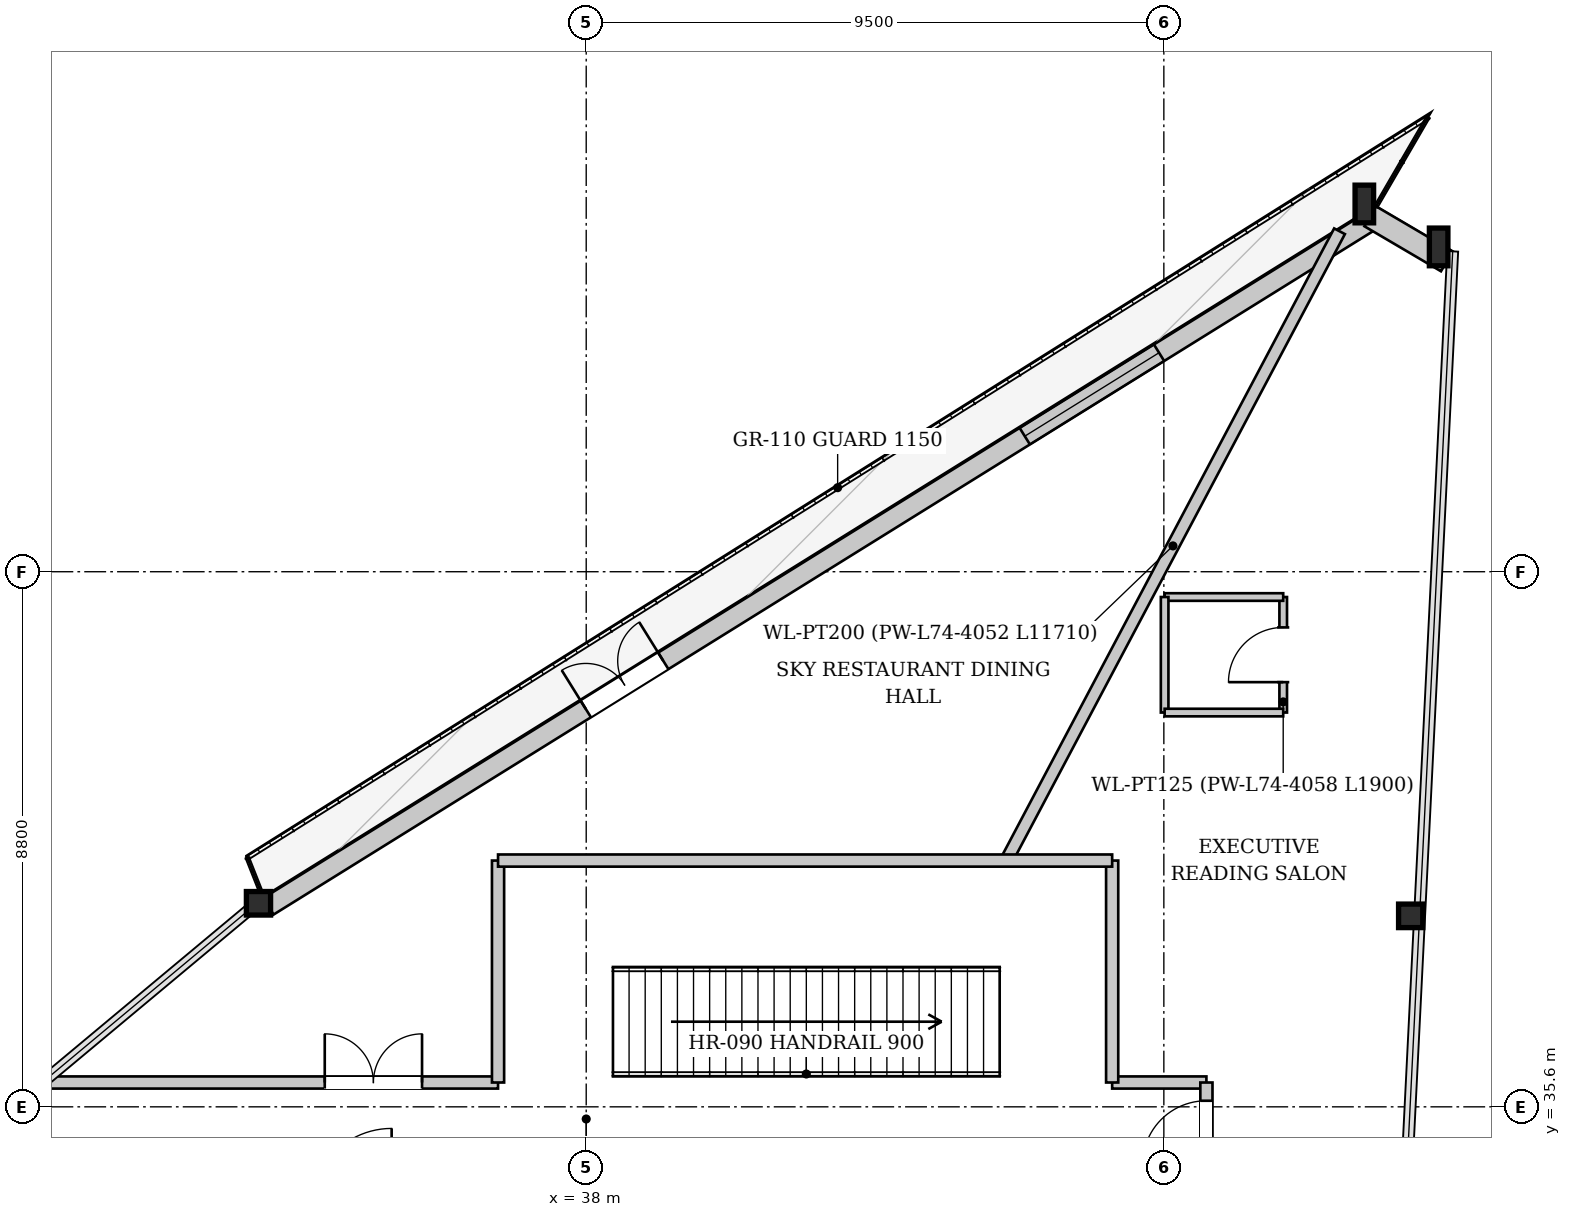
"""IFC4 building model, lengths in metres.
Left out: names, types, materials, properties, quantities, classifications, styles, units other than length and angle.
Written with IfcOpenShell. Run it as: python <this file> out.ifc"""

import sys

from ifc_helpers import new_model, si_unit, direction, frame, frame_2d, origin, origin_2d, place, context, subcontext, project, spatial, rectangle, i_section, extrude, source, transform, mapped, element, fill, save


model = new_model("IFC4")
c1 = context("Model", 3, precision=1e-05, world=origin(), true_north=direction((0.0, 1.0)))
c2 = subcontext(c1, "Body", "Model", "MODEL_VIEW")
j1 = project(units=[si_unit("LENGTHUNIT", "METRE"), si_unit("PLANEANGLEUNIT", "RADIAN")], contexts=[c1])
p1 = place(None, origin())
s1 = spatial("IfcSite", under=j1, at=p1, CompositionType="ELEMENT")
p2 = place(p1, origin())
s2 = spatial("IfcBuilding", under=s1, at=p2, CompositionType="ELEMENT")
p3 = place(p2, frame((0.0, 0.0, 277.7)))
s3 = spatial("IfcBuildingStorey", under=s2, at=p3, CompositionType="ELEMENT", Elevation=277.7)
m1 = source(origin(), c2, "Body", "SweptSolid", [
    extrude(i_section(OverallWidth=0.305, OverallDepth=0.62, WebThickness=0.021, FlangeThickness=0.04, at=origin_2d()), origin(), (0.0, 0.0, 1.0), 3.965),
])
p4 = place(p3, frame((52.25, 49.668, 0.0), z_axis=(-0.116565767107, 0.036761628612, 0.992502395262), x_axis=(-0.30076967496, -0.953696808543, 0.0)))
e1 = element("IfcColumn", 1, at=p4, inside=s3, PredefinedType="COLUMN", context=c2, shape_type="MappedRepresentation", body=[
    mapped(m1, transform((0.0, 0.0, 0.0), x_axis=(1.0, 0.0, 0.0), y_axis=(0.0, 1.0, 0.0), z_axis=(0.0, 0.0, 1.0), scale=1.0)),
])
m2 = source(origin(), c2, "Body", "SweptSolid", [
    extrude(i_section(OverallWidth=0.305, OverallDepth=0.62, WebThickness=0.021, FlangeThickness=0.04, at=origin_2d()), origin(), (0.0, 0.0, 1.0), 3.955),
])
p5 = place(p3, frame((50.991, 50.409, 0.0), z_axis=(-0.098091029512, 0.019568820865, 0.994985030631), x_axis=(-0.195641369689, -0.980675509262, 0.0)))
e2 = element("IfcColumn", 2, at=p5, inside=s3, PredefinedType="COLUMN", context=c2, shape_type="MappedRepresentation", body=[
    mapped(m2, transform((0.0, 0.0, 0.0), x_axis=(1.0, 0.0, 0.0), y_axis=(0.0, 1.0, 0.0), z_axis=(0.0, 0.0, 1.0), scale=1.0)),
])
m3 = source(origin(), c2, "Body", "SweptSolid", [
    extrude(i_section(OverallWidth=0.398, OverallDepth=0.387, WebThickness=0.019, FlangeThickness=0.029, at=origin_2d()), origin(), (0.0, 0.0, 1.0), 3.942),
])
p6 = place(p3, frame((32.689, 39.033, 0.0), z_axis=(-0.040194461777, -0.043724637927, 0.998234722538), x_axis=(0.736201135631, -0.676762800318, 0.0)))
e3 = element("IfcColumn", 3, at=p6, inside=s3, PredefinedType="COLUMN", context=c2, shape_type="MappedRepresentation", body=[
    mapped(m3, transform((0.0, 0.0, 0.0), x_axis=(1.0, 0.0, 0.0), y_axis=(0.0, 1.0, 0.0), z_axis=(0.0, 0.0, 1.0), scale=1.0)),
])
m4 = source(origin(), c2, "Body", "SweptSolid", [
    extrude(i_section(OverallWidth=0.398, OverallDepth=0.387, WebThickness=0.019, FlangeThickness=0.029, at=origin_2d()), origin(), (0.0, 0.0, 1.0), 3.949),
])
p7 = place(p3, frame((51.702, 38.656, 0.0), z_axis=(-0.072270027482, 0.043213643464, 0.996448505517), x_axis=(-0.513199536889, -0.858269325641, 0.0)))
e4 = element("IfcColumn", 4, at=p7, inside=s3, PredefinedType="COLUMN", context=c2, shape_type="MappedRepresentation", body=[
    mapped(m4, transform((0.0, 0.0, 0.0), x_axis=(1.0, 0.0, 0.0), y_axis=(0.0, 1.0, 0.0), z_axis=(0.0, 0.0, 1.0), scale=1.0)),
])
p8 = place(p3, frame((32.774, 38.898, 0.0), z_axis=(0.0, 0.0, 1.0), x_axis=(0.849325275004, 0.527869848769, 0.0)))
e5 = element("IfcWall", 5, at=p8, inside=s3, PredefinedType="SOLIDWALL", context=c2, shape_type="SweptSolid", body=[
    extrude(rectangle(XDim=21.549, YDim=0.32, at=frame_2d((10.774, 0.0))), origin(), (0.0, 0.0, 1.0), 3.462),
])
p9 = place(p8, frame((6.146, 0.0, 0.0)))
e6 = element("IfcOpeningElement", 6, at=p9, cuts=e5, PredefinedType="OPENING", context=c2, shape_type="SweptSolid", body=[
    extrude(rectangle(XDim=1.5, YDim=2.3, at=frame_2d((0.75, 1.15))), frame((0.0, 0.17, 0.0), z_axis=(0.0, -1.0, 0.0), x_axis=(1.0, 0.0, 0.0)), (0.0, 0.0, 1.0), 0.34),
])
p10 = place(p8, frame((14.646, 0.0, 0.65)))
e7 = element("IfcOpeningElement", 7, at=p10, cuts=e5, PredefinedType="OPENING", context=c2, shape_type="SweptSolid", body=[
    extrude(rectangle(XDim=2.6, YDim=2.35, at=frame_2d((1.3, 1.175))), frame((0.0, 0.17, 0.0), z_axis=(0.0, -1.0, 0.0), x_axis=(1.0, 0.0, 0.0)), (0.0, 0.0, 1.0), 0.34),
])
p11 = place(p3, frame((50.895, 50.245, 0.0), z_axis=(0.0, 0.0, 1.0), x_axis=(0.862045920942, -0.506830178844, 0.0)))
e8 = element("IfcWall", 8, at=p11, inside=s3, PredefinedType="SOLIDWALL", context=c2, shape_type="SweptSolid", body=[
    extrude(rectangle(XDim=1.46, YDim=0.38, at=frame_2d((0.73, 0.0))), origin(), (0.0, 0.0, 1.0), 3.462),
])
p12 = place(p3, frame((44.91, 39.65, 0.0), z_axis=(0.0, 0.0, 1.0), x_axis=(0.467924120406, 0.883768644806, 0.0)))
e9 = element("IfcWall", 9, at=p12, inside=s3, PredefinedType="PARTITIONING", context=c2, shape_type="SweptSolid", body=[
    extrude(rectangle(XDim=11.71, YDim=0.2, at=frame_2d((5.855, 0.0))), origin(), (0.0, 0.0, 1.0), 3.515),
])
p13 = place(p3, frame((49.463, 42.084, 0.0), z_axis=(0.0, 0.0, 1.0), x_axis=(0.0, 1.0, 0.0)))
e10 = element("IfcWall", 10, at=p13, inside=s3, PredefinedType="PARTITIONING", context=c2, shape_type="SweptSolid", body=[
    extrude(rectangle(XDim=1.9, YDim=0.125, at=frame_2d((0.95, 0.0))), origin(), (0.0, 0.0, 1.0), 3.92),
])
p14 = place(p13, frame((0.5, 0.0, 0.0)))
e11 = element("IfcOpeningElement", 11, at=p14, cuts=e10, PredefinedType="OPENING", context=c2, shape_type="SweptSolid", body=[
    extrude(rectangle(XDim=0.9, YDim=2.1, at=frame_2d((0.45, 1.05))), frame((0.0, 0.073, 0.0), z_axis=(0.0, -1.0, 0.0), x_axis=(1.0, 0.0, 0.0)), (0.0, 0.0, 1.0), 0.145),
])
p15 = place(p3, frame((49.463, 43.984, 0.0), z_axis=(0.0, 0.0, 1.0), x_axis=(-1.0, 0.0, 0.0)))
e12 = element("IfcWall", 12, at=p15, inside=s3, PredefinedType="PARTITIONING", context=c2, shape_type="SweptSolid", body=[
    extrude(rectangle(XDim=1.95, YDim=0.125, at=frame_2d((0.975, 0.0))), origin(), (0.0, 0.0, 1.0), 3.92),
])
p16 = place(p3, frame((47.513, 43.984, 0.0), z_axis=(0.0, 0.0, 1.0), x_axis=(0.0, -1.0, 0.0)))
e13 = element("IfcWall", 13, at=p16, inside=s3, PredefinedType="PARTITIONING", context=c2, shape_type="SweptSolid", body=[
    extrude(rectangle(XDim=1.9, YDim=0.125, at=frame_2d((0.95, 0.0))), origin(), (0.0, 0.0, 1.0), 3.92),
])
p17 = place(p3, frame((47.513, 42.084, 0.0), z_axis=(0.0, 0.0, 1.0), x_axis=(1.0, 0.0, 0.0)))
e14 = element("IfcWall", 14, at=p17, inside=s3, PredefinedType="PARTITIONING", context=c2, shape_type="SweptSolid", body=[
    extrude(rectangle(XDim=1.95, YDim=0.125, at=frame_2d((0.975, 0.0))), origin(), (0.0, 0.0, 1.0), 3.92),
])
p18 = place(p3, frame((29.101, 36.0, 0.0), z_axis=(0.0, 0.0, 1.0), x_axis=(1.0, 0.0, 0.0)))
e15 = element("IfcWall", 15, at=p18, inside=s3, PredefinedType="PARTITIONING", context=c2, shape_type="SweptSolid", body=[
    extrude(rectangle(XDim=7.449, YDim=0.2, at=frame_2d((3.725, 0.0))), origin(), (0.0, 0.0, 1.0), 3.92),
])
p19 = place(p18, frame((4.599, 0.0, 0.0)))
e16 = element("IfcOpeningElement", 16, at=p19, cuts=e15, PredefinedType="OPENING", context=c2, shape_type="SweptSolid", body=[
    extrude(rectangle(XDim=1.6, YDim=2.2, at=frame_2d((0.8, 1.1))), frame((0.0, 0.11, 0.0), z_axis=(0.0, -1.0, 0.0), x_axis=(1.0, 0.0, 0.0)), (0.0, 0.0, 1.0), 0.22),
])
p20 = place(p3, frame((46.65, 36.0, 0.0), z_axis=(0.0, 0.0, 1.0), x_axis=(1.0, 0.0, 0.0)))
e17 = element("IfcWall", 17, at=p20, inside=s3, PredefinedType="PARTITIONING", context=c2, shape_type="SweptSolid", body=[
    extrude(rectangle(XDim=1.55, YDim=0.2, at=frame_2d((0.775, 0.0))), origin(), (0.0, 0.0, 1.0), 3.92),
])
p21 = place(p3, frame((48.2, 23.0, 0.0), z_axis=(0.0, 0.0, 1.0), x_axis=(0.0, 1.0, 0.0)))
e18 = element("IfcWall", 18, at=p21, inside=s3, PredefinedType="PARTITIONING", context=c2, shape_type="SweptSolid", body=[
    extrude(rectangle(XDim=13.0, YDim=0.2, at=frame_2d((6.5, 0.0))), origin(), (0.0, 0.0, 1.0), 3.605),
])
p22 = place(p21, frame((6.366, 0.0, 0.0)))
e19 = element("IfcOpeningElement", 19, at=p22, cuts=e18, PredefinedType="OPENING", context=c2, shape_type="SweptSolid", body=[
    extrude(rectangle(XDim=1.05, YDim=2.2, at=frame_2d((0.525, 1.1))), frame((0.0, 0.11, 0.0), z_axis=(0.0, -1.0, 0.0), x_axis=(1.0, 0.0, 0.0)), (0.0, 0.0, 1.0), 0.22),
])
p23 = place(p21, frame((11.65, 0.0, 0.0)))
e20 = element("IfcOpeningElement", 20, at=p23, cuts=e18, PredefinedType="OPENING", context=c2, shape_type="SweptSolid", body=[
    extrude(rectangle(XDim=1.05, YDim=2.2, at=frame_2d((0.525, 1.1))), frame((0.0, 0.11, 0.0), z_axis=(0.0, -1.0, 0.0), x_axis=(1.0, 0.0, 0.0)), (0.0, 0.0, 1.0), 0.22),
])
for number, where, z_axis, x_axis in (
    (21, (36.55, 36.0, 0.0), (0.0, 0.0, 1.0), (0.0, 1.0, 0.0)),
    (22, (46.65, 36.0, 0.0), (0.0, 0.0, 1.0), (0.0, 1.0, 0.0)),
):
    element("IfcWall", number, at=place(p3, frame(where, z_axis=z_axis, x_axis=x_axis)), inside=s3, PredefinedType="PARTITIONING", context=c2, shape_type="SweptSolid", body=[
        extrude(rectangle(XDim=3.65, YDim=0.2, at=frame_2d((1.825, 0.0))), origin(), (0.0, 0.0, 1.0), 3.92),
    ])
p24 = place(p3, frame((36.55, 39.65, 0.0), z_axis=(0.0, 0.0, 1.0), x_axis=(1.0, 0.0, 0.0)))
e23 = element("IfcWall", 23, at=p24, inside=s3, PredefinedType="PARTITIONING", context=c2, shape_type="SweptSolid", body=[
    extrude(rectangle(XDim=10.1, YDim=0.2, at=frame_2d((5.05, 0.0))), origin(), (0.0, 0.0, 1.0), 3.92),
])
m5 = source(origin(), c2, "Body", "SweptSolid", [
    extrude(rectangle(XDim=1.5, YDim=2.3, at=frame_2d((0.75, 1.15))), frame((0.0, 0.025, 0.0), z_axis=(0.0, -1.0, 0.0), x_axis=(1.0, 0.0, 0.0)), (0.0, 0.0, 1.0), 0.05),
])
p25 = place(p9, origin())
e24 = element("IfcDoor", 24, at=p25, inside=s3, OperationType="DOUBLE_DOOR_SINGLE_SWING", PredefinedType="DOOR", context=c2, shape_type="MappedRepresentation", body=[
    mapped(m5, transform((0.0, 0.0, 0.0), x_axis=(1.0, 0.0, 0.0), y_axis=(0.0, 1.0, 0.0), z_axis=(0.0, 0.0, 1.0), scale=1.0)),
])
fill(e6, e24)
m6 = source(origin(), c2, "Body", "SweptSolid", [
    extrude(rectangle(XDim=2.6, YDim=2.35, at=frame_2d((1.3, 1.175))), frame((0.0, 0.03, 0.0), z_axis=(0.0, -1.0, 0.0), x_axis=(1.0, 0.0, 0.0)), (0.0, 0.0, 1.0), 0.06),
])
p26 = place(p10, origin())
e25 = element("IfcWindow", 25, at=p26, inside=s3, PartitioningType="SINGLE_PANEL", PredefinedType="WINDOW", context=c2, shape_type="MappedRepresentation", body=[
    mapped(m6, transform((0.0, 0.0, 0.0), x_axis=(1.0, 0.0, 0.0), y_axis=(0.0, 1.0, 0.0), z_axis=(0.0, 0.0, 1.0), scale=1.0)),
])
fill(e7, e25)
m7 = source(origin(), c2, "Body", "SweptSolid", [
    extrude(rectangle(XDim=0.9, YDim=2.1, at=frame_2d((0.45, 1.05))), frame((0.0, 0.025, 0.0), z_axis=(0.0, -1.0, 0.0), x_axis=(1.0, 0.0, 0.0)), (0.0, 0.0, 1.0), 0.05),
])
p27 = place(p14, origin())
e26 = element("IfcDoor", 26, at=p27, inside=s3, OperationType="SINGLE_SWING_LEFT", PredefinedType="DOOR", context=c2, shape_type="MappedRepresentation", body=[
    mapped(m7, transform((0.0, 0.0, 0.0), x_axis=(1.0, 0.0, 0.0), y_axis=(0.0, 1.0, 0.0), z_axis=(0.0, 0.0, 1.0), scale=1.0)),
])
fill(e11, e26)
m8 = source(origin(), c2, "Body", "SweptSolid", [
    extrude(rectangle(XDim=1.6, YDim=2.2, at=frame_2d((0.8, 1.1))), frame((0.0, 0.025, 0.0), z_axis=(0.0, -1.0, 0.0), x_axis=(1.0, 0.0, 0.0)), (0.0, 0.0, 1.0), 0.05),
])
p28 = place(p19, origin())
e27 = element("IfcDoor", 27, at=p28, inside=s3, OperationType="DOUBLE_DOOR_SINGLE_SWING", PredefinedType="DOOR", context=c2, shape_type="MappedRepresentation", body=[
    mapped(m8, transform((0.0, 0.0, 0.0), x_axis=(1.0, 0.0, 0.0), y_axis=(0.0, 1.0, 0.0), z_axis=(0.0, 0.0, 1.0), scale=1.0)),
])
fill(e16, e27)
m9 = source(origin(), c2, "Body", "SweptSolid", [
    extrude(rectangle(XDim=1.05, YDim=2.2, at=frame_2d((0.525, 1.1))), frame((0.0, 0.025, 0.0), z_axis=(0.0, -1.0, 0.0), x_axis=(1.0, 0.0, 0.0)), (0.0, 0.0, 1.0), 0.05),
])
p29 = place(p23, origin())
e28 = element("IfcDoor", 28, at=p29, inside=s3, OperationType="SINGLE_SWING_LEFT", PredefinedType="DOOR", context=c2, shape_type="MappedRepresentation", body=[
    mapped(m9, transform((0.0, 0.0, 0.0), x_axis=(1.0, 0.0, 0.0), y_axis=(0.0, 1.0, 0.0), z_axis=(0.0, 0.0, 1.0), scale=1.0)),
])
fill(e20, e28)
save(model, sys.argv[1])
